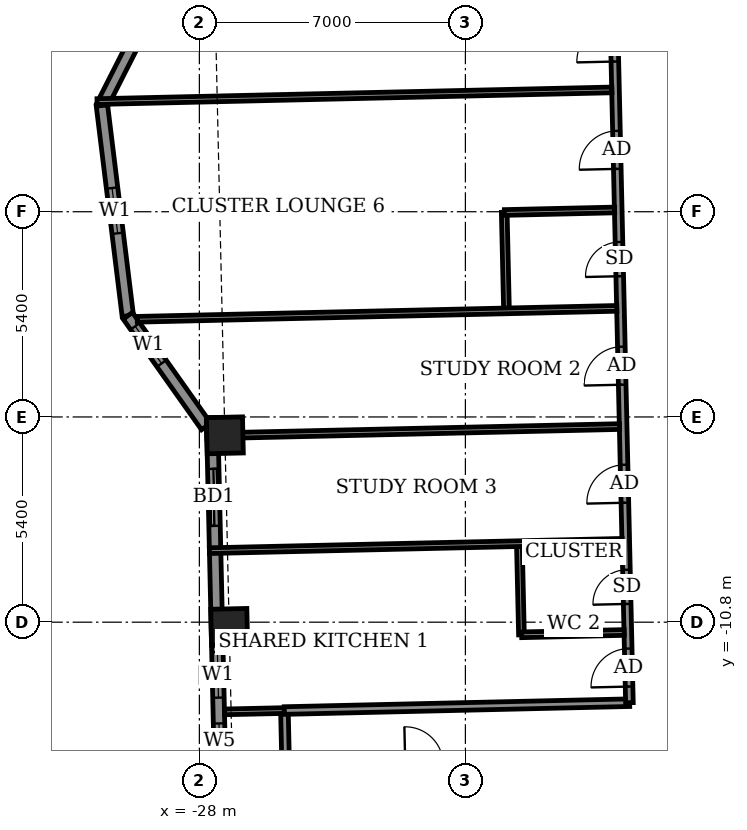
"""IFC4 building model, lengths in metres.
Left out: names, types, materials, properties, quantities, classifications, styles, units other than length and angle.
Written with IfcOpenShell. Run it as: python <this file> out.ifc"""

import sys

from ifc_helpers import new_model, si_unit, direction, frame, frame_2d, origin, origin_2d, place, context, subcontext, project, spatial, rectangle, extrude, element, fill, save


model = new_model("IFC4")
c1 = context("Model", 3, precision=1e-05, world=origin(), true_north=direction((0.0, 1.0)))
c2 = subcontext(c1, "Body", "Model", "MODEL_VIEW")
j1 = project(units=[si_unit("LENGTHUNIT", "METRE"), si_unit("PLANEANGLEUNIT", "RADIAN")], contexts=[c1])
p1 = place(None, origin())
s1 = spatial("IfcSite", under=j1, at=p1, CompositionType="ELEMENT")
p2 = place(p1, origin())
s2 = spatial("IfcBuilding", under=s1, at=p2, CompositionType="ELEMENT")
p3 = place(p2, frame((0.0, 0.0, 279.9)))
s3 = spatial("IfcBuildingStorey", under=s2, at=p3, CompositionType="ELEMENT", Elevation=279.9)
for number, where, z_axis, x_axis in (
    (1, (-27.329, -5.883, -0.55), (0.0, 0.0, 1.0), (0.023, -1.0, 0.0)),
    (2, (-27.215, -10.924, -0.55), (0.0, 0.0, 1.0), (0.023, -1.0, 0.0)),
):
    element("IfcColumn", number, at=place(p3, frame(where, z_axis=z_axis, x_axis=x_axis)), inside=s3, PredefinedType="COLUMN", context=c2, shape_type="SweptSolid", body=[
        extrude(rectangle(XDim=0.95, YDim=0.95, at=origin_2d()), origin(), (0.0, 0.0, 1.0), 3.6),
    ])
p4 = place(p3, frame((-28.12, 7.608, 0.0), z_axis=(0.0, 0.0, 1.0), x_axis=(-0.45266802131, -0.891679125293, 0.0)))
e3 = element("IfcWall", 3, at=p4, inside=s3, PredefinedType="SOLIDWALL", context=c2, shape_type="SweptSolid", body=[
    extrude(rectangle(XDim=5.399, YDim=0.3, at=frame_2d((2.699, 0.0))), origin(), (0.0, 0.0, 1.0), 3.05),
])
p5 = place(p4, frame((2.008, 0.0, 0.9)))
e4 = element("IfcOpeningElement", 4, at=p5, cuts=e3, PredefinedType="OPENING", context=c2, shape_type="SweptSolid", body=[
    extrude(rectangle(XDim=1.2, YDim=1.5, at=frame_2d((0.6, 0.75))), frame((0.0, 0.16, 0.0), z_axis=(0.0, -1.0, 0.0), x_axis=(1.0, 0.0, 0.0)), (0.0, 0.0, 1.0), 0.32),
])
p6 = place(p3, frame((-30.564, 2.794, 0.0), z_axis=(0.0, 0.0, 1.0), x_axis=(0.122163831021, -0.992509948761, 0.0)))
e5 = element("IfcWall", 5, at=p6, inside=s3, PredefinedType="SOLIDWALL", context=c2, shape_type="SweptSolid", body=[
    extrude(rectangle(XDim=5.574, YDim=0.3, at=frame_2d((2.787, 0.0))), origin(), (0.0, 0.0, 1.0), 3.05),
])
p7 = place(p6, frame((2.187, 0.0, 0.9)))
e6 = element("IfcOpeningElement", 6, at=p7, cuts=e5, PredefinedType="OPENING", context=c2, shape_type="SweptSolid", body=[
    extrude(rectangle(XDim=1.2, YDim=1.5, at=frame_2d((0.6, 0.75))), frame((0.0, 0.16, 0.0), z_axis=(0.0, -1.0, 0.0), x_axis=(1.0, 0.0, 0.0)), (0.0, 0.0, 1.0), 0.32),
])
p8 = place(p3, frame((-29.883, -2.738, 0.0), z_axis=(0.0, 0.0, 1.0), x_axis=(0.578095163598, -0.815969351033, 0.0)))
e7 = element("IfcWall", 7, at=p8, inside=s3, PredefinedType="SOLIDWALL", context=c2, shape_type="SweptSolid", body=[
    extrude(rectangle(XDim=3.569, YDim=0.3, at=frame_2d((1.784, 0.0))), origin(), (0.0, 0.0, 1.0), 3.05),
])
p9 = place(p8, frame((0.338, 0.0, 0.9)))
e8 = element("IfcOpeningElement", 8, at=p9, cuts=e7, PredefinedType="OPENING", context=c2, shape_type="SweptSolid", body=[
    extrude(rectangle(XDim=1.2, YDim=1.5, at=frame_2d((0.6, 0.75))), frame((0.0, 0.16, 0.0), z_axis=(0.0, -1.0, 0.0), x_axis=(1.0, 0.0, 0.0)), (0.0, 0.0, 1.0), 0.32),
])
p10 = place(p3, frame((-27.665, -5.416, 0.0), z_axis=(0.0, 0.0, 1.0), x_axis=(0.022660024814, -0.999743228672, 0.0)))
e9 = element("IfcWall", 9, at=p10, inside=s3, PredefinedType="SOLIDWALL", context=c2, shape_type="SweptSolid", body=[
    extrude(rectangle(XDim=15.45, YDim=0.3, at=frame_2d((7.725, 0.0))), origin(), (0.0, 0.0, 1.0), 2.55),
])
p11 = place(p10, frame((1.35, 0.0, 0.0)))
e10 = element("IfcOpeningElement", 10, at=p11, cuts=e9, PredefinedType="OPENING", context=c2, shape_type="SweptSolid", body=[
    extrude(rectangle(XDim=1.5, YDim=2.4, at=frame_2d((0.75, 1.2))), frame((0.0, 0.16, 0.0), z_axis=(0.0, -1.0, 0.0), x_axis=(1.0, 0.0, 0.0)), (0.0, 0.0, 1.0), 0.32),
])
p12 = place(p10, frame((6.171, 0.0, 0.9)))
e11 = element("IfcOpeningElement", 11, at=p12, cuts=e9, PredefinedType="OPENING", context=c2, shape_type="SweptSolid", body=[
    extrude(rectangle(XDim=1.2, YDim=1.5, at=frame_2d((0.6, 0.75))), frame((0.0, 0.16, 0.0), z_axis=(0.0, -1.0, 0.0), x_axis=(1.0, 0.0, 0.0)), (0.0, 0.0, 1.0), 0.32),
])
p13 = place(p10, frame((8.05, 0.0, 0.9)))
e12 = element("IfcOpeningElement", 12, at=p13, cuts=e9, PredefinedType="OPENING", context=c2, shape_type="SweptSolid", body=[
    extrude(rectangle(XDim=0.9, YDim=1.5, at=frame_2d((0.45, 0.75))), frame((0.0, 0.16, 0.0), z_axis=(0.0, -1.0, 0.0), x_axis=(1.0, 0.0, 0.0)), (0.0, 0.0, 1.0), 0.32),
])
p14 = place(p10, frame((11.625, 0.0, 0.9)))
e13 = element("IfcOpeningElement", 13, at=p14, cuts=e9, PredefinedType="OPENING", context=c2, shape_type="SweptSolid", body=[
    extrude(rectangle(XDim=2.4, YDim=1.5, at=frame_2d((1.2, 0.75))), frame((0.0, 0.16, 0.0), z_axis=(0.0, -1.0, 0.0), x_axis=(1.0, 0.0, 0.0)), (0.0, 0.0, 1.0), 0.32),
])
p15 = place(p3, frame((-30.234, -14.077, 0.0), z_axis=(0.0, 0.0, 1.0), x_axis=(-0.022865581321, 0.999738548417, 0.0)))
e14 = element("IfcWall", 14, at=p15, inside=s3, PredefinedType="USERDEFINED", context=c2, shape_type="SweptSolid", body=[
    extrude(rectangle(XDim=6.0, YDim=0.55, at=frame_2d((3.0, 0.0))), origin(), (0.0, 0.0, 1.0), 0.8),
])
p16 = place(p3, frame((-25.731, -14.624, 0.0), z_axis=(0.0, 0.0, 1.0), x_axis=(0.999742799525, 0.022678950563, 0.0)))
e15 = element("IfcWall", 15, at=p16, inside=s3, PredefinedType="PARTITIONING", context=c2, shape_type="SweptSolid", body=[
    extrude(rectangle(XDim=55.386, YDim=0.2, at=frame_2d((27.693, 0.0))), origin(), (0.0, 0.0, 1.0), 3.05),
])
p17 = place(p16, frame((3.149, 0.0, 0.0)))
e16 = element("IfcOpeningElement", 16, at=p17, cuts=e15, PredefinedType="OPENING", context=c2, shape_type="SweptSolid", body=[
    extrude(rectangle(XDim=1.0, YDim=2.1, at=frame_2d((0.5, 1.05))), frame((0.0, 0.11, 0.0), z_axis=(0.0, -1.0, 0.0), x_axis=(1.0, 0.0, 0.0)), (0.0, 0.0, 1.0), 0.22),
])
p18 = place(p16, frame((11.1, 0.0, 0.0)))
e17 = element("IfcOpeningElement", 17, at=p18, cuts=e15, PredefinedType="OPENING", context=c2, shape_type="SweptSolid", body=[
    extrude(rectangle(XDim=0.9, YDim=2.1, at=frame_2d((0.45, 1.05))), frame((0.0, 0.11, 0.0), z_axis=(0.0, -1.0, 0.0), x_axis=(1.0, 0.0, 0.0)), (0.0, 0.0, 1.0), 0.22),
])
p19 = place(p16, frame((12.95, 0.0, 0.0)))
e18 = element("IfcOpeningElement", 18, at=p19, cuts=e15, PredefinedType="OPENING", context=c2, shape_type="SweptSolid", body=[
    extrude(rectangle(XDim=0.9, YDim=2.1, at=frame_2d((0.45, 1.05))), frame((0.0, 0.11, 0.0), z_axis=(0.0, -1.0, 0.0), x_axis=(1.0, 0.0, 0.0)), (0.0, 0.0, 1.0), 0.22),
])
p20 = place(p16, frame((19.675, 0.0, 0.0)))
e19 = element("IfcOpeningElement", 19, at=p20, cuts=e15, PredefinedType="OPENING", context=c2, shape_type="SweptSolid", body=[
    extrude(rectangle(XDim=0.9, YDim=2.1, at=frame_2d((0.45, 1.05))), frame((0.0, 0.11, 0.0), z_axis=(0.0, -1.0, 0.0), x_axis=(1.0, 0.0, 0.0)), (0.0, 0.0, 1.0), 0.22),
])
p21 = place(p16, frame((21.7, 0.0, 0.0)))
e20 = element("IfcOpeningElement", 20, at=p21, cuts=e15, PredefinedType="OPENING", context=c2, shape_type="SweptSolid", body=[
    extrude(rectangle(XDim=0.9, YDim=2.1, at=frame_2d((0.45, 1.05))), frame((0.0, 0.11, 0.0), z_axis=(0.0, -1.0, 0.0), x_axis=(1.0, 0.0, 0.0)), (0.0, 0.0, 1.0), 0.22),
])
p22 = place(p16, frame((28.475, 0.0, 0.0)))
e21 = element("IfcOpeningElement", 21, at=p22, cuts=e15, PredefinedType="OPENING", context=c2, shape_type="SweptSolid", body=[
    extrude(rectangle(XDim=0.9, YDim=2.1, at=frame_2d((0.45, 1.05))), frame((0.0, 0.11, 0.0), z_axis=(0.0, -1.0, 0.0), x_axis=(1.0, 0.0, 0.0)), (0.0, 0.0, 1.0), 0.22),
])
p23 = place(p16, frame((30.45, 0.0, 0.0)))
e22 = element("IfcOpeningElement", 22, at=p23, cuts=e15, PredefinedType="OPENING", context=c2, shape_type="SweptSolid", body=[
    extrude(rectangle(XDim=0.9, YDim=2.1, at=frame_2d((0.45, 1.05))), frame((0.0, 0.11, 0.0), z_axis=(0.0, -1.0, 0.0), x_axis=(1.0, 0.0, 0.0)), (0.0, 0.0, 1.0), 0.22),
])
p24 = place(p16, frame((37.25, 0.0, 0.0)))
e23 = element("IfcOpeningElement", 23, at=p24, cuts=e15, PredefinedType="OPENING", context=c2, shape_type="SweptSolid", body=[
    extrude(rectangle(XDim=0.9, YDim=2.1, at=frame_2d((0.45, 1.05))), frame((0.0, 0.11, 0.0), z_axis=(0.0, -1.0, 0.0), x_axis=(1.0, 0.0, 0.0)), (0.0, 0.0, 1.0), 0.22),
])
p25 = place(p16, frame((39.175, 0.0, 0.0)))
e24 = element("IfcOpeningElement", 24, at=p25, cuts=e15, PredefinedType="OPENING", context=c2, shape_type="SweptSolid", body=[
    extrude(rectangle(XDim=0.9, YDim=2.1, at=frame_2d((0.45, 1.05))), frame((0.0, 0.11, 0.0), z_axis=(0.0, -1.0, 0.0), x_axis=(1.0, 0.0, 0.0)), (0.0, 0.0, 1.0), 0.22),
])
p26 = place(p16, frame((45.875, 0.0, 0.0)))
e25 = element("IfcOpeningElement", 25, at=p26, cuts=e15, PredefinedType="OPENING", context=c2, shape_type="SweptSolid", body=[
    extrude(rectangle(XDim=0.9, YDim=2.1, at=frame_2d((0.45, 1.05))), frame((0.0, 0.11, 0.0), z_axis=(0.0, -1.0, 0.0), x_axis=(1.0, 0.0, 0.0)), (0.0, 0.0, 1.0), 0.22),
])
p27 = place(p16, frame((51.127, 0.0, 0.0)))
e26 = element("IfcOpeningElement", 26, at=p27, cuts=e15, PredefinedType="OPENING", context=c2, shape_type="SweptSolid", body=[
    extrude(rectangle(XDim=1.0, YDim=2.1, at=frame_2d((0.5, 1.05))), frame((0.0, 0.11, 0.0), z_axis=(0.0, -1.0, 0.0), x_axis=(1.0, 0.0, 0.0)), (0.0, 0.0, 1.0), 0.22),
])
p28 = place(p3, frame((-25.728, -14.624, 0.0), z_axis=(0.0, 0.0, 1.0), x_axis=(-0.022632637625, 0.99974384905, 0.0)))
e27 = element("IfcWall", 27, at=p28, inside=s3, PredefinedType="PARTITIONING", context=c2, shape_type="SweptSolid", body=[
    extrude(rectangle(XDim=1.5, YDim=0.2, at=frame_2d((0.75, 0.0))), origin(), (0.0, 0.0, 1.0), 3.05),
])
p29 = place(p3, frame((-27.339, -13.16, 0.0), z_axis=(0.0, 0.0, 1.0), x_axis=(0.999754171712, 0.022171967518, 0.0)))
e28 = element("IfcWall", 28, at=p29, inside=s3, PredefinedType="PARTITIONING", context=c2, shape_type="SweptSolid", body=[
    extrude(rectangle(XDim=1.575, YDim=0.15, at=frame_2d((0.787, 0.0))), origin(), (0.0, 0.0, 1.0), 2.55),
])
p30 = place(p3, frame((-25.765, -13.125, 0.0), z_axis=(0.0, 0.0, 1.0), x_axis=(0.999740502457, 0.022779985654, 0.0)))
e29 = element("IfcWall", 29, at=p30, inside=s3, PredefinedType="PARTITIONING", context=c2, shape_type="SweptSolid", body=[
    extrude(rectangle(XDim=9.088, YDim=0.2, at=frame_2d((4.544, 0.0))), origin(), (0.0, 0.0, 1.0), 3.05),
])
p31 = place(p3, frame((-16.684, -12.919, 0.0), z_axis=(0.0, 0.0, 1.0), x_axis=(-0.022712214871, 0.999742044377, 0.0)))
e30 = element("IfcWall", 30, at=p31, inside=s3, PredefinedType="PARTITIONING", context=c2, shape_type="SweptSolid", body=[
    extrude(rectangle(XDim=26.551, YDim=0.2, at=frame_2d((13.275, 0.0))), origin(), (0.0, 0.0, 1.0), 3.05),
])
p32 = place(p31, frame((24.688, 0.0, 0.0)))
e31 = element("IfcOpeningElement", 31, at=p32, cuts=e30, PredefinedType="OPENING", context=c2, shape_type="SweptSolid", body=[
    extrude(rectangle(XDim=1.0, YDim=2.1, at=frame_2d((0.5, 1.05))), frame((0.0, 0.11, 0.0), z_axis=(0.0, -1.0, 0.0), x_axis=(1.0, 0.0, 0.0)), (0.0, 0.0, 1.0), 0.22),
])
p33 = place(p31, frame((21.975, 0.0, 0.0)))
e32 = element("IfcOpeningElement", 32, at=p33, cuts=e30, PredefinedType="OPENING", context=c2, shape_type="SweptSolid", body=[
    extrude(rectangle(XDim=0.9, YDim=2.1, at=frame_2d((0.45, 1.05))), frame((0.0, 0.11, 0.0), z_axis=(0.0, -1.0, 0.0), x_axis=(1.0, 0.0, 0.0)), (0.0, 0.0, 1.0), 0.22),
])
p34 = place(p31, frame((16.875, 0.0, 0.0)))
e33 = element("IfcOpeningElement", 33, at=p34, cuts=e30, PredefinedType="OPENING", context=c2, shape_type="SweptSolid", body=[
    extrude(rectangle(XDim=1.0, YDim=2.1, at=frame_2d((0.5, 1.05))), frame((0.0, 0.11, 0.0), z_axis=(0.0, -1.0, 0.0), x_axis=(1.0, 0.0, 0.0)), (0.0, 0.0, 1.0), 0.22),
])
p35 = place(p31, frame((19.375, 0.0, 0.0)))
e34 = element("IfcOpeningElement", 34, at=p35, cuts=e30, PredefinedType="OPENING", context=c2, shape_type="SweptSolid", body=[
    extrude(rectangle(XDim=0.9, YDim=2.1, at=frame_2d((0.45, 1.05))), frame((0.0, 0.11, 0.0), z_axis=(0.0, -1.0, 0.0), x_axis=(1.0, 0.0, 0.0)), (0.0, 0.0, 1.0), 0.22),
])
p36 = place(p31, frame((14.05, 0.0, 0.0)))
e35 = element("IfcOpeningElement", 35, at=p36, cuts=e30, PredefinedType="OPENING", context=c2, shape_type="SweptSolid", body=[
    extrude(rectangle(XDim=1.0, YDim=2.1, at=frame_2d((0.5, 1.05))), frame((0.0, 0.11, 0.0), z_axis=(0.0, -1.0, 0.0), x_axis=(1.0, 0.0, 0.0)), (0.0, 0.0, 1.0), 0.22),
])
p37 = place(p31, frame((11.225, 0.0, 0.0)))
e36 = element("IfcOpeningElement", 36, at=p37, cuts=e30, PredefinedType="OPENING", context=c2, shape_type="SweptSolid", body=[
    extrude(rectangle(XDim=0.9, YDim=2.1, at=frame_2d((0.45, 1.05))), frame((0.0, 0.11, 0.0), z_axis=(0.0, -1.0, 0.0), x_axis=(1.0, 0.0, 0.0)), (0.0, 0.0, 1.0), 0.22),
])
p38 = place(p31, frame((8.37, 0.0, 0.0)))
e37 = element("IfcOpeningElement", 37, at=p38, cuts=e30, PredefinedType="OPENING", context=c2, shape_type="SweptSolid", body=[
    extrude(rectangle(XDim=1.0, YDim=2.1, at=frame_2d((0.5, 1.05))), frame((0.0, 0.11, 0.0), z_axis=(0.0, -1.0, 0.0), x_axis=(1.0, 0.0, 0.0)), (0.0, 0.0, 1.0), 0.22),
])
p39 = place(p31, frame((5.263, 0.0, 0.0)))
e38 = element("IfcOpeningElement", 38, at=p39, cuts=e30, PredefinedType="OPENING", context=c2, shape_type="SweptSolid", body=[
    extrude(rectangle(XDim=1.0, YDim=2.1, at=frame_2d((0.5, 1.05))), frame((0.0, 0.11, 0.0), z_axis=(0.0, -1.0, 0.0), x_axis=(1.0, 0.0, 0.0)), (0.0, 0.0, 1.0), 0.22),
])
p40 = place(p31, frame((0.425, 0.0, 0.0)))
e39 = element("IfcOpeningElement", 39, at=p40, cuts=e30, PredefinedType="OPENING", context=c2, shape_type="SweptSolid", body=[
    extrude(rectangle(XDim=1.0, YDim=2.1, at=frame_2d((0.5, 1.05))), frame((0.0, 0.11, 0.0), z_axis=(0.0, -1.0, 0.0), x_axis=(1.0, 0.0, 0.0)), (0.0, 0.0, 1.0), 0.22),
])
p41 = place(p31, frame((2.6, 0.0, 0.0)))
e40 = element("IfcOpeningElement", 40, at=p41, cuts=e30, PredefinedType="OPENING", context=c2, shape_type="SweptSolid", body=[
    extrude(rectangle(XDim=0.9, YDim=2.1, at=frame_2d((0.45, 1.05))), frame((0.0, 0.11, 0.0), z_axis=(0.0, -1.0, 0.0), x_axis=(1.0, 0.0, 0.0)), (0.0, 0.0, 1.0), 0.22),
])
p42 = place(p3, frame((-19.525, -11.133, 0.0), z_axis=(0.0, 0.0, 1.0), x_axis=(-0.022781023197, 0.999740478815, 0.0)))
e41 = element("IfcWall", 41, at=p42, inside=s3, PredefinedType="PARTITIONING", context=c2, shape_type="SweptSolid", body=[
    extrude(rectangle(XDim=2.325, YDim=0.15, at=frame_2d((1.163, 0.0))), origin(), (0.0, 0.0, 1.0), 3.05),
])
p43 = place(p3, frame((-19.52, -11.132, 0.0), z_axis=(0.0, 0.0, 1.0), x_axis=(0.999744396973, 0.02260842146, 0.0)))
e42 = element("IfcWall", 42, at=p43, inside=s3, PredefinedType="PARTITIONING", context=c2, shape_type="SweptSolid", body=[
    extrude(rectangle(XDim=2.7, YDim=0.15, at=frame_2d((1.35, 0.0))), origin(), (0.0, 0.0, 1.0), 3.05),
])
p44 = place(p3, frame((-27.736, -8.918, 0.0), z_axis=(0.0, 0.0, 1.0), x_axis=(0.999743862053, 0.02263206324, 0.0)))
e43 = element("IfcWall", 43, at=p44, inside=s3, PredefinedType="PARTITIONING", context=c2, shape_type="SweptSolid", body=[
    extrude(rectangle(XDim=10.863, YDim=0.15, at=frame_2d((5.431, 0.0))), origin(), (0.0, 0.0, 1.0), 2.55),
])
p45 = place(p3, frame((-27.804, -5.899, 0.0), z_axis=(0.0, 0.0, 1.0), x_axis=(0.999743850541, 0.02263257177, 0.0)))
e44 = element("IfcWall", 44, at=p45, inside=s3, PredefinedType="PARTITIONING", context=c2, shape_type="SweptSolid", body=[
    extrude(rectangle(XDim=10.863, YDim=0.15, at=frame_2d((5.431, 0.0))), origin(), (0.0, 0.0, 1.0), 3.05),
])
p46 = place(p3, frame((-19.92, -2.539, 0.0), z_axis=(0.0, 0.0, 1.0), x_axis=(-0.023013537724, 0.999735153469, 0.0)))
e45 = element("IfcWall", 45, at=p46, inside=s3, PredefinedType="PARTITIONING", context=c2, shape_type="SweptSolid", body=[
    extrude(rectangle(XDim=2.525, YDim=0.15, at=frame_2d((1.262, 0.0))), origin(), (0.0, 0.0, 1.0), 3.05),
])
p47 = place(p3, frame((-29.634, -2.83, 0.0), z_axis=(0.0, 0.0, 1.0), x_axis=(0.999741276056, 0.022746009531, 0.0)))
e46 = element("IfcWall", 46, at=p47, inside=s3, PredefinedType="PARTITIONING", context=c2, shape_type="SweptSolid", body=[
    extrude(rectangle(XDim=12.622, YDim=0.15, at=frame_2d((6.311, 0.0))), origin(), (0.0, 0.0, 1.0), 2.05),
])
p48 = place(p3, frame((-19.973, -0.02, 0.0), z_axis=(0.0, 0.0, 1.0), x_axis=(0.999741748633, 0.022725229174, 0.0)))
e47 = element("IfcWall", 47, at=p48, inside=s3, PredefinedType="PARTITIONING", context=c2, shape_type="SweptSolid", body=[
    extrude(rectangle(XDim=2.901, YDim=0.15, at=frame_2d((1.45, 0.0))), origin(), (0.0, 0.0, 1.0), 3.05),
])
p49 = place(p3, frame((-30.692, 2.898, 0.0), z_axis=(0.0, 0.0, 1.0), x_axis=(0.999743099019, 0.022665744279, 0.0)))
e48 = element("IfcWall", 48, at=p49, inside=s3, PredefinedType="PARTITIONING", context=c2, shape_type="SweptSolid", body=[
    extrude(rectangle(XDim=13.55, YDim=0.15, at=frame_2d((6.775, 0.0))), origin(), (0.0, 0.0, 1.0), 2.05),
])
p50 = place(p7, origin())
e49 = element("IfcWindow", 49, at=p50, inside=s3, PartitioningType="SINGLE_PANEL", PredefinedType="WINDOW", context=c2, shape_type="SweptSolid", body=[
    extrude(rectangle(XDim=1.2, YDim=1.5, at=frame_2d((0.6, 0.75))), frame((0.0, 0.03, 0.0), z_axis=(0.0, -1.0, 0.0), x_axis=(1.0, 0.0, 0.0)), (0.0, 0.0, 1.0), 0.06),
])
fill(e6, e49)
p51 = place(p9, origin())
e50 = element("IfcWindow", 50, at=p51, inside=s3, PartitioningType="SINGLE_PANEL", PredefinedType="WINDOW", context=c2, shape_type="SweptSolid", body=[
    extrude(rectangle(XDim=1.2, YDim=1.5, at=frame_2d((0.6, 0.75))), frame((0.0, 0.03, 0.0), z_axis=(0.0, -1.0, 0.0), x_axis=(1.0, 0.0, 0.0)), (0.0, 0.0, 1.0), 0.06),
])
fill(e8, e50)
p52 = place(p11, origin())
e51 = element("IfcDoor", 51, at=p52, inside=s3, OperationType="SLIDING_TO_LEFT", PredefinedType="DOOR", context=c2, shape_type="SweptSolid", body=[
    extrude(rectangle(XDim=1.5, YDim=2.4, at=frame_2d((0.75, 1.2))), frame((0.0, 0.025, 0.0), z_axis=(0.0, -1.0, 0.0), x_axis=(1.0, 0.0, 0.0)), (0.0, 0.0, 1.0), 0.05),
])
fill(e10, e51)
p53 = place(p12, origin())
e52 = element("IfcWindow", 52, at=p53, inside=s3, PartitioningType="SINGLE_PANEL", PredefinedType="WINDOW", context=c2, shape_type="SweptSolid", body=[
    extrude(rectangle(XDim=1.2, YDim=1.5, at=frame_2d((0.6, 0.75))), frame((0.0, 0.03, 0.0), z_axis=(0.0, -1.0, 0.0), x_axis=(1.0, 0.0, 0.0)), (0.0, 0.0, 1.0), 0.06),
])
fill(e11, e52)
p54 = place(p13, origin())
e53 = element("IfcWindow", 53, at=p54, inside=s3, PartitioningType="SINGLE_PANEL", PredefinedType="WINDOW", context=c2, shape_type="SweptSolid", body=[
    extrude(rectangle(XDim=0.9, YDim=1.5, at=frame_2d((0.45, 0.75))), frame((0.0, 0.03, 0.0), z_axis=(0.0, -1.0, 0.0), x_axis=(1.0, 0.0, 0.0)), (0.0, 0.0, 1.0), 0.06),
])
fill(e12, e53)
p55 = place(p34, origin())
e54 = element("IfcDoor", 54, at=p55, inside=s3, OperationType="SINGLE_SWING_RIGHT", PredefinedType="DOOR", context=c2, shape_type="SweptSolid", body=[
    extrude(rectangle(XDim=1.0, YDim=2.1, at=frame_2d((0.5, 1.05))), frame((0.0, 0.025, 0.0), z_axis=(0.0, -1.0, 0.0), x_axis=(1.0, 0.0, 0.0)), (0.0, 0.0, 1.0), 0.05),
])
fill(e33, e54)
p56 = place(p36, origin())
e55 = element("IfcDoor", 55, at=p56, inside=s3, OperationType="SINGLE_SWING_LEFT", PredefinedType="DOOR", context=c2, shape_type="SweptSolid", body=[
    extrude(rectangle(XDim=1.0, YDim=2.1, at=frame_2d((0.5, 1.05))), frame((0.0, 0.025, 0.0), z_axis=(0.0, -1.0, 0.0), x_axis=(1.0, 0.0, 0.0)), (0.0, 0.0, 1.0), 0.05),
])
fill(e35, e55)
p57 = place(p37, origin())
e56 = element("IfcDoor", 56, at=p57, inside=s3, OperationType="SINGLE_SWING_RIGHT", PredefinedType="DOOR", context=c2, shape_type="SweptSolid", body=[
    extrude(rectangle(XDim=0.9, YDim=2.1, at=frame_2d((0.45, 1.05))), frame((0.0, 0.025, 0.0), z_axis=(0.0, -1.0, 0.0), x_axis=(1.0, 0.0, 0.0)), (0.0, 0.0, 1.0), 0.05),
])
fill(e36, e56)
p58 = place(p38, origin())
e57 = element("IfcDoor", 57, at=p58, inside=s3, OperationType="SINGLE_SWING_RIGHT", PredefinedType="DOOR", context=c2, shape_type="SweptSolid", body=[
    extrude(rectangle(XDim=1.0, YDim=2.1, at=frame_2d((0.5, 1.05))), frame((0.0, 0.025, 0.0), z_axis=(0.0, -1.0, 0.0), x_axis=(1.0, 0.0, 0.0)), (0.0, 0.0, 1.0), 0.05),
])
fill(e37, e57)
p59 = place(p39, origin())
e58 = element("IfcDoor", 58, at=p59, inside=s3, OperationType="SINGLE_SWING_LEFT", PredefinedType="DOOR", context=c2, shape_type="SweptSolid", body=[
    extrude(rectangle(XDim=1.0, YDim=2.1, at=frame_2d((0.5, 1.05))), frame((0.0, 0.025, 0.0), z_axis=(0.0, -1.0, 0.0), x_axis=(1.0, 0.0, 0.0)), (0.0, 0.0, 1.0), 0.05),
])
fill(e38, e58)
p60 = place(p40, origin())
e59 = element("IfcDoor", 59, at=p60, inside=s3, OperationType="SINGLE_SWING_RIGHT", PredefinedType="DOOR", context=c2, shape_type="SweptSolid", body=[
    extrude(rectangle(XDim=1.0, YDim=2.1, at=frame_2d((0.5, 1.05))), frame((0.0, 0.025, 0.0), z_axis=(0.0, -1.0, 0.0), x_axis=(1.0, 0.0, 0.0)), (0.0, 0.0, 1.0), 0.05),
])
fill(e39, e59)
p61 = place(p41, origin())
e60 = element("IfcDoor", 60, at=p61, inside=s3, OperationType="SINGLE_SWING_LEFT", PredefinedType="DOOR", context=c2, shape_type="SweptSolid", body=[
    extrude(rectangle(XDim=0.9, YDim=2.1, at=frame_2d((0.45, 1.05))), frame((0.0, 0.025, 0.0), z_axis=(0.0, -1.0, 0.0), x_axis=(1.0, 0.0, 0.0)), (0.0, 0.0, 1.0), 0.05),
])
fill(e40, e60)
save(model, sys.argv[1])
